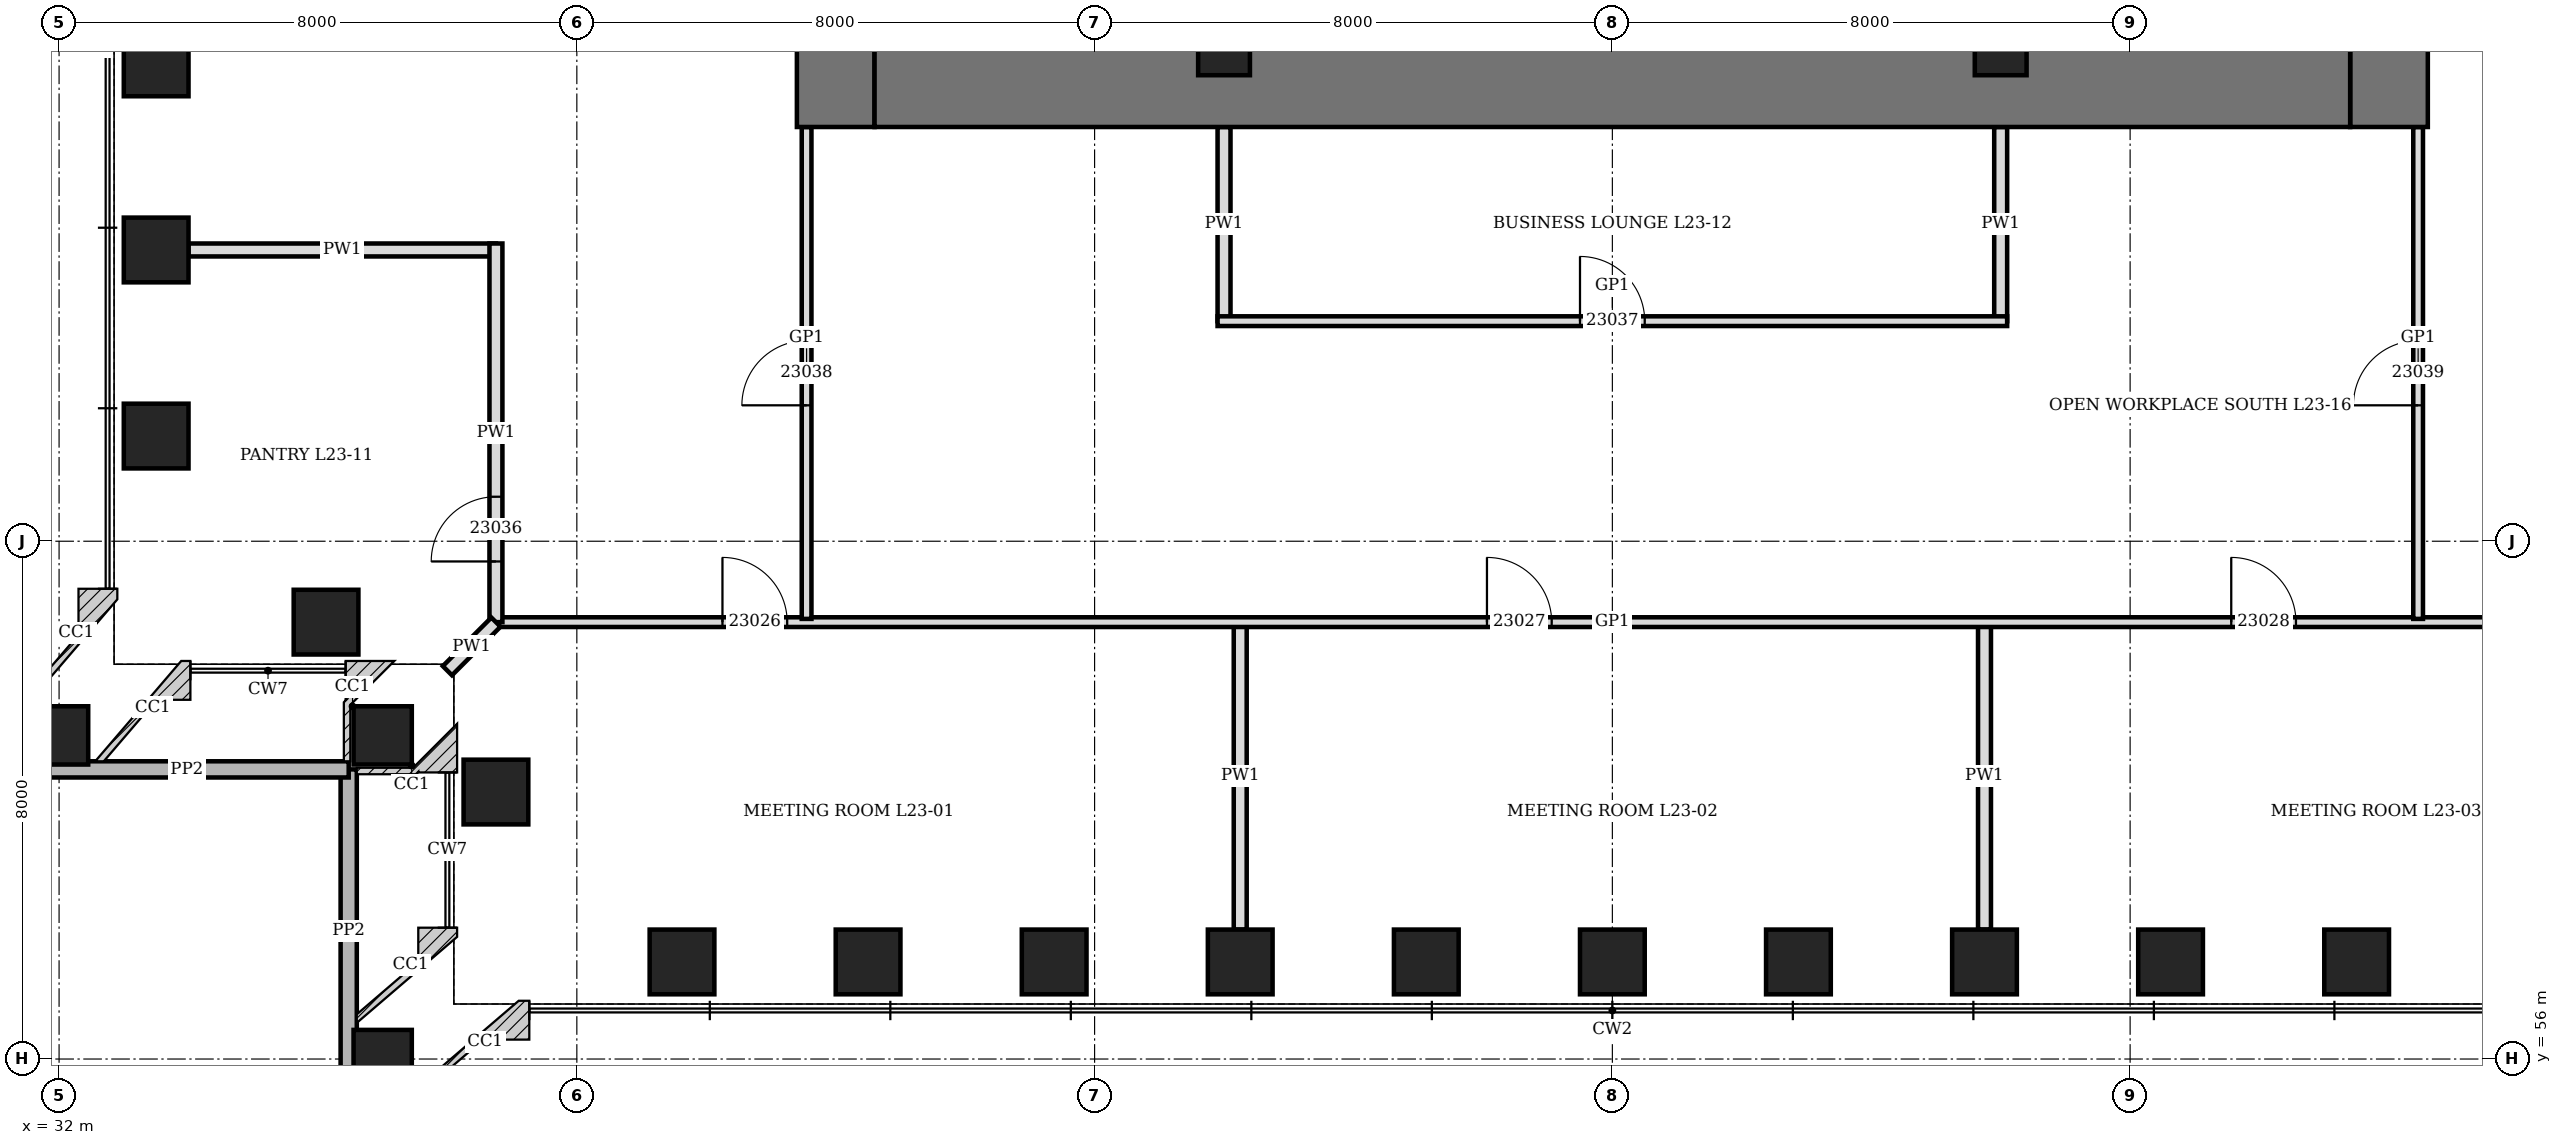
"""IFC4 building model, lengths in metres.
Left out: names, types, materials, properties, quantities, classifications, styles, units other than length and angle.
Written with IfcOpenShell. Run it as: python <this file> out.ifc"""

import sys

from ifc_helpers import new_model, si_unit, direction, frame, frame_2d, origin, origin_2d, place, context, subcontext, project, spatial, rectangle, hollow_rectangle, extrude, clip, halfspace, element, fill, save


model = new_model("IFC4")
c1 = context("Model", 3, precision=1e-05, world=origin(), true_north=direction((0.0, 1.0)))
c2 = subcontext(c1, "Body", "Model", "MODEL_VIEW")
j1 = project(units=[si_unit("LENGTHUNIT", "METRE"), si_unit("PLANEANGLEUNIT", "RADIAN")], contexts=[c1])
p1 = place(None, origin())
s1 = spatial("IfcSite", under=j1, at=p1, CompositionType="ELEMENT")
p2 = place(p1, origin())
s2 = spatial("IfcBuilding", under=s1, at=p2, CompositionType="ELEMENT")
p3 = place(p2, frame((0.0, 0.0, 108.1)))
s3 = spatial("IfcBuildingStorey", under=s2, at=p3, CompositionType="ELEMENT", Elevation=108.1)
p4 = place(p3, frame((37.0, 56.0, -0.25), z_axis=(0.349200787792, 0.299314960964, 0.887957974202), x_axis=(-0.650791373456, 0.759256602365, 0.0)))
e1 = element("IfcColumn", 1, at=p4, inside=s3, PredefinedType="COLUMN", context=c2, shape_type="Clipping", body=[
    clip(clip(extrude(hollow_rectangle(XDim=0.9, YDim=0.9, WallThickness=0.2, at=origin_2d()), origin(), (0.0, 0.0, 1.0), 5.011), halfspace(frame((0.0, 0.0, 0.235), z_axis=(0.0, 0.0, 1.0), x_axis=(1.0, 0.0, 0.0)), True)), halfspace(frame((0.0, 0.0, 4.776), z_axis=(0.0, 0.0, -1.0), x_axis=(1.0, 0.0, 0.0)), True)),
])
for number, where, z_axis, x_axis in (
    (2, (41.625, 57.5, -0.25), (0.0, 0.0, 1.0), (1.0, 0.0, 0.0)),
    (3, (44.5, 57.5, -0.25), (0.0, 0.0, 1.0), (1.0, 0.0, 0.0)),
    (4, (47.375, 57.5, -0.25), (0.0, 0.0, 1.0), (1.0, 0.0, 0.0)),
    (5, (50.25, 57.5, -0.25), (0.0, 0.0, 1.0), (1.0, 0.0, 0.0)),
    (6, (53.125, 57.5, -0.25), (0.0, 0.0, 1.0), (1.0, 0.0, 0.0)),
    (7, (56.0, 57.5, -0.25), (0.0, 0.0, 1.0), (1.0, 0.0, 0.0)),
    (8, (58.875, 57.5, -0.25), (0.0, 0.0, 1.0), (1.0, 0.0, 0.0)),
    (9, (61.75, 57.5, -0.25), (0.0, 0.0, 1.0), (1.0, 0.0, 0.0)),
    (10, (64.625, 57.5, -0.25), (0.0, 0.0, 1.0), (1.0, 0.0, 0.0)),
    (11, (67.5, 57.5, -0.25), (0.0, 0.0, 1.0), (1.0, 0.0, 0.0)),
    (12, (33.5, 71.375, -0.25), (0.0, 0.0, 1.0), (0.0, 1.0, 0.0)),
    (13, (33.5, 68.5, -0.25), (0.0, 0.0, 1.0), (0.0, 1.0, 0.0)),
    (14, (33.5, 65.625, -0.25), (0.0, 0.0, 1.0), (0.0, 1.0, 0.0)),
):
    element("IfcColumn", number, at=place(p3, frame(where, z_axis=z_axis, x_axis=x_axis)), inside=s3, PredefinedType="COLUMN", context=c2, shape_type="SweptSolid", body=[
        extrude(hollow_rectangle(XDim=1.0, YDim=1.0, WallThickness=0.35, at=origin_2d()), origin(), (0.0, 0.0, 1.0), 4.45),
    ])
p5 = place(p3, frame((32.0, 61.0, -0.25), z_axis=(0.299314960964, 0.349200787792, 0.887957974202), x_axis=(-0.759256602365, 0.650791373456, 0.0)))
e15 = element("IfcColumn", 15, at=p5, inside=s3, PredefinedType="COLUMN", context=c2, shape_type="Clipping", body=[
    clip(clip(extrude(hollow_rectangle(XDim=0.9, YDim=0.9, WallThickness=0.2, at=origin_2d()), origin(), (0.0, 0.0, 1.0), 5.011), halfspace(frame((0.0, 0.0, 0.235), z_axis=(0.0, 0.0, 1.0), x_axis=(1.0, 0.0, 0.0)), True)), halfspace(frame((0.0, 0.0, 4.776), z_axis=(0.0, 0.0, -1.0), x_axis=(1.0, 0.0, 0.0)), True)),
])
p6 = place(p3, frame((36.125, 62.75, -0.25), z_axis=(0.0, 0.0, 1.0), x_axis=(1.0, 0.0, 0.0)))
e16 = element("IfcColumn", 16, at=p6, inside=s3, PredefinedType="COLUMN", context=c2, shape_type="SweptSolid", body=[
    extrude(hollow_rectangle(XDim=1.0, YDim=1.0, WallThickness=0.35, at=origin_2d()), origin(), (0.0, 0.0, 1.0), 4.45),
])
p7 = place(p3, frame((37.0, 61.0, -0.25), z_axis=(0.343685624304, 0.343685624304, 0.873933855216), x_axis=(-0.707106781187, 0.707106781187, 0.0)))
e17 = element("IfcColumn", 17, at=p7, inside=s3, PredefinedType="COLUMN", context=c2, shape_type="Clipping", body=[
    clip(clip(extrude(hollow_rectangle(XDim=0.9, YDim=0.9, WallThickness=0.2, at=origin_2d()), origin(), (0.0, 0.0, 1.0), 5.092), halfspace(frame((0.0, 0.0, 0.253), z_axis=(0.0, 0.0, 1.0), x_axis=(1.0, 0.0, 0.0)), True)), halfspace(frame((0.0, 0.0, 4.839), z_axis=(0.0, 0.0, -1.0), x_axis=(1.0, 0.0, 0.0)), True)),
])
p8 = place(p3, frame((38.75, 60.125, -0.25), z_axis=(0.0, 0.0, 1.0), x_axis=(0.0, 1.0, 0.0)))
e18 = element("IfcColumn", 18, at=p8, inside=s3, PredefinedType="COLUMN", context=c2, shape_type="SweptSolid", body=[
    extrude(hollow_rectangle(XDim=1.0, YDim=1.0, WallThickness=0.35, at=origin_2d()), origin(), (0.0, 0.0, 1.0), 4.45),
])
p9 = place(p3, frame((44.0, 70.4, 0.0), z_axis=(0.0, 0.0, 1.0), x_axis=(0.0, 1.0, 0.0)))
e19 = element("IfcWall", 19, at=p9, inside=s3, PredefinedType="SHEAR", context=c2, shape_type="SweptSolid", body=[
    extrude(rectangle(XDim=19.2, YDim=1.2, at=frame_2d((9.6, 0.0))), origin(), (0.0, 0.0, 1.0), 4.2),
])
p10 = place(p9, frame((8.6, 0.0, 0.0)))
e20 = element("IfcOpeningElement", 20, at=p10, cuts=e19, PredefinedType="OPENING", context=c2, shape_type="SweptSolid", body=[
    extrude(rectangle(XDim=2.0, YDim=2.4, at=frame_2d((1.0, 1.2))), frame((0.0, 0.61, 0.0), z_axis=(0.0, -1.0, 0.0), x_axis=(1.0, 0.0, 0.0)), (0.0, 0.0, 1.0), 1.22),
])
p11 = place(p3, frame((68.0, 70.4, 0.0), z_axis=(0.0, 0.0, 1.0), x_axis=(0.0, 1.0, 0.0)))
e21 = element("IfcWall", 21, at=p11, inside=s3, PredefinedType="SHEAR", context=c2, shape_type="SweptSolid", body=[
    extrude(rectangle(XDim=19.2, YDim=1.2, at=frame_2d((9.6, 0.0))), origin(), (0.0, 0.0, 1.0), 4.2),
])
p12 = place(p11, frame((8.6, 0.0, 0.0)))
e22 = element("IfcOpeningElement", 22, at=p12, cuts=e21, PredefinedType="OPENING", context=c2, shape_type="SweptSolid", body=[
    extrude(rectangle(XDim=2.0, YDim=2.4, at=frame_2d((1.0, 1.2))), frame((0.0, 0.61, 0.0), z_axis=(0.0, -1.0, 0.0), x_axis=(1.0, 0.0, 0.0)), (0.0, 0.0, 1.0), 1.22),
])
p13 = place(p3, frame((44.6, 71.0, 0.0), z_axis=(0.0, 0.0, 1.0), x_axis=(1.0, 0.0, 0.0)))
e23 = element("IfcWall", 23, at=p13, inside=s3, PredefinedType="SHEAR", context=c2, shape_type="SweptSolid", body=[
    extrude(rectangle(XDim=22.8, YDim=1.2, at=frame_2d((11.4, 0.0))), origin(), (0.0, 0.0, 1.0), 4.2),
])
for number, where, z_axis, x_axis in (
    (24, (50.0, 71.6, 0.0), (0.0, 0.0, 1.0), (1.0, 0.0, 0.0)),
    (25, (62.0, 71.6, 0.0), (0.0, 0.0, 1.0), (1.0, 0.0, 0.0)),
):
    element("IfcColumn", number, at=place(p3, frame(where, z_axis=z_axis, x_axis=x_axis)), inside=s3, PredefinedType="COLUMN", context=c2, shape_type="SweptSolid", body=[
        extrude(hollow_rectangle(XDim=0.8, YDim=0.8, WallThickness=0.1, at=origin_2d()), origin(), (0.0, 0.0, 1.0), 4.2),
    ])
for number, where, z_axis, x_axis in (
    (26, (36.475, 55.475, 0.0), (0.0, 0.0, 1.0), (0.0, 1.0, 0.0)),
    (27, (36.475, 60.475, 0.0), (0.0, 0.0, 1.0), (-1.0, 0.0, 0.0)),
):
    element("IfcWall", number, at=place(p3, frame(where, z_axis=z_axis, x_axis=x_axis)), inside=s3, PredefinedType="PARAPET", context=c2, shape_type="SweptSolid", body=[
        extrude(rectangle(XDim=5.0, YDim=0.25, at=frame_2d((2.5, 0.0))), origin(), (0.0, 0.0, 1.0), 1.1),
    ])
for number, where, z_axis, x_axis in (
    (28, (50.25, 58.0, 0.0), (0.0, 0.0, 1.0), (0.0, 1.0, 0.0)),
    (29, (61.75, 58.0, 0.0), (0.0, 0.0, 1.0), (0.0, 1.0, 0.0)),
):
    element("IfcWall", number, at=place(p3, frame(where, z_axis=z_axis, x_axis=x_axis)), inside=s3, PredefinedType="PARTITIONING", context=c2, shape_type="SweptSolid", body=[
        extrude(rectangle(XDim=4.75, YDim=0.2, at=frame_2d((2.375, 0.0))), origin(), (0.0, 0.0, 1.0), 3.278),
    ])
p14 = place(p3, frame((34.0, 68.5, 0.0), z_axis=(0.0, 0.0, 1.0), x_axis=(1.0, 0.0, 0.0)))
e30 = element("IfcWall", 30, at=p14, inside=s3, PredefinedType="PARTITIONING", context=c2, shape_type="SweptSolid", body=[
    extrude(rectangle(XDim=4.75, YDim=0.2, at=frame_2d((2.375, 0.0))), origin(), (0.0, 0.0, 1.0), 3.428),
])
for number, where, z_axis, x_axis in (
    (31, (50.0, 67.4, 0.0), (0.0, 0.0, 1.0), (0.0, 1.0, 0.0)),
    (32, (62.0, 67.4, 0.0), (0.0, 0.0, 1.0), (0.0, 1.0, 0.0)),
):
    element("IfcWall", number, at=place(p3, frame(where, z_axis=z_axis, x_axis=x_axis)), inside=s3, PredefinedType="PARTITIONING", context=c2, shape_type="SweptSolid", body=[
        extrude(rectangle(XDim=3.0, YDim=0.2, at=frame_2d((1.5, 0.0))), origin(), (0.0, 0.0, 1.0), 4.04),
    ])
p15 = place(p3, frame((38.75, 62.75, 0.0), z_axis=(0.0, 0.0, 1.0), x_axis=(1.0, 0.0, 0.0)))
e33 = element("IfcWall", 33, at=p15, inside=s3, PredefinedType="PARTITIONING", context=c2, shape_type="SweptSolid", body=[
    extrude(rectangle(XDim=34.5, YDim=0.15, at=frame_2d((17.25, 0.0))), origin(), (0.0, 0.0, 1.0), 4.04),
])
p16 = place(p15, frame((3.5, 0.0, 0.0)))
e34 = element("IfcOpeningElement", 34, at=p16, cuts=e33, PredefinedType="OPENING", context=c2, shape_type="SweptSolid", body=[
    extrude(rectangle(XDim=1.0, YDim=2.4, at=frame_2d((0.5, 1.2))), frame((0.0, 0.085, 0.0), z_axis=(0.0, -1.0, 0.0), x_axis=(1.0, 0.0, 0.0)), (0.0, 0.0, 1.0), 0.17),
])
p17 = place(p15, frame((15.312, 0.0, 0.0)))
e35 = element("IfcOpeningElement", 35, at=p17, cuts=e33, PredefinedType="OPENING", context=c2, shape_type="SweptSolid", body=[
    extrude(rectangle(XDim=1.0, YDim=2.4, at=frame_2d((0.5, 1.2))), frame((0.0, 0.085, 0.0), z_axis=(0.0, -1.0, 0.0), x_axis=(1.0, 0.0, 0.0)), (0.0, 0.0, 1.0), 0.17),
])
p18 = place(p15, frame((26.812, 0.0, 0.0)))
e36 = element("IfcOpeningElement", 36, at=p18, cuts=e33, PredefinedType="OPENING", context=c2, shape_type="SweptSolid", body=[
    extrude(rectangle(XDim=1.0, YDim=2.4, at=frame_2d((0.5, 1.2))), frame((0.0, 0.085, 0.0), z_axis=(0.0, -1.0, 0.0), x_axis=(1.0, 0.0, 0.0)), (0.0, 0.0, 1.0), 0.17),
])
p19 = place(p3, frame((49.9, 67.4, 0.0), z_axis=(0.0, 0.0, 1.0), x_axis=(1.0, 0.0, 0.0)))
e37 = element("IfcWall", 37, at=p19, inside=s3, PredefinedType="PARTITIONING", context=c2, shape_type="SweptSolid", body=[
    extrude(rectangle(XDim=12.2, YDim=0.15, at=frame_2d((6.1, 0.0))), origin(), (0.0, 0.0, 1.0), 4.04),
])
p20 = place(p19, frame((5.6, 0.0, 0.0)))
e38 = element("IfcOpeningElement", 38, at=p20, cuts=e37, PredefinedType="OPENING", context=c2, shape_type="SweptSolid", body=[
    extrude(rectangle(XDim=1.0, YDim=2.4, at=frame_2d((0.5, 1.2))), frame((0.0, 0.085, 0.0), z_axis=(0.0, -1.0, 0.0), x_axis=(1.0, 0.0, 0.0)), (0.0, 0.0, 1.0), 0.17),
])
p21 = place(p3, frame((38.75, 62.75, 0.0), z_axis=(0.0, 0.0, 1.0), x_axis=(0.0, 1.0, 0.0)))
e39 = element("IfcWall", 39, at=p21, inside=s3, PredefinedType="PARTITIONING", context=c2, shape_type="SweptSolid", body=[
    extrude(rectangle(XDim=5.85, YDim=0.2, at=frame_2d((2.925, 0.0))), origin(), (0.0, 0.0, 1.0), 4.04),
])
p22 = place(p21, frame((0.938, 0.0, 0.0)))
e40 = element("IfcOpeningElement", 40, at=p22, cuts=e39, PredefinedType="OPENING", context=c2, shape_type="SweptSolid", body=[
    extrude(rectangle(XDim=1.0, YDim=2.1, at=frame_2d((0.5, 1.05))), frame((0.0, 0.11, 0.0), z_axis=(0.0, -1.0, 0.0), x_axis=(1.0, 0.0, 0.0)), (0.0, 0.0, 1.0), 0.22),
])
p23 = place(p3, frame((43.55, 62.8, 0.0), z_axis=(0.0, 0.0, 1.0), x_axis=(0.0, 1.0, 0.0)))
e41 = element("IfcWall", 41, at=p23, inside=s3, PredefinedType="PARTITIONING", context=c2, shape_type="SweptSolid", body=[
    extrude(rectangle(XDim=7.6, YDim=0.15, at=frame_2d((3.8, 0.0))), origin(), (0.0, 0.0, 1.0), 4.04),
])
p24 = place(p23, frame((3.3, 0.0, 0.0)))
e42 = element("IfcOpeningElement", 42, at=p24, cuts=e41, PredefinedType="OPENING", context=c2, shape_type="SweptSolid", body=[
    extrude(rectangle(XDim=1.0, YDim=2.4, at=frame_2d((0.5, 1.2))), frame((0.0, 0.085, 0.0), z_axis=(0.0, -1.0, 0.0), x_axis=(1.0, 0.0, 0.0)), (0.0, 0.0, 1.0), 0.17),
])
p25 = place(p3, frame((68.45, 62.8, 0.0), z_axis=(0.0, 0.0, 1.0), x_axis=(0.0, 1.0, 0.0)))
e43 = element("IfcWall", 43, at=p25, inside=s3, PredefinedType="PARTITIONING", context=c2, shape_type="SweptSolid", body=[
    extrude(rectangle(XDim=7.6, YDim=0.15, at=frame_2d((3.8, 0.0))), origin(), (0.0, 0.0, 1.0), 4.04),
])
p26 = place(p25, frame((3.3, 0.0, 0.0)))
e44 = element("IfcOpeningElement", 44, at=p26, cuts=e43, PredefinedType="OPENING", context=c2, shape_type="SweptSolid", body=[
    extrude(rectangle(XDim=1.0, YDim=2.4, at=frame_2d((0.5, 1.2))), frame((0.0, 0.085, 0.0), z_axis=(0.0, -1.0, 0.0), x_axis=(1.0, 0.0, 0.0)), (0.0, 0.0, 1.0), 0.17),
])
p27 = place(p3, frame((38.75, 62.75, 0.0), z_axis=(0.0, 0.0, 1.0), x_axis=(-0.707106781187, -0.707106781187, 0.0)))
e45 = element("IfcWall", 45, at=p27, inside=s3, PredefinedType="PARTITIONING", context=c2, shape_type="SweptSolid", body=[
    extrude(rectangle(XDim=1.061, YDim=0.2, at=frame_2d((0.53, 0.0))), origin(), (0.0, 0.0, 1.0), 4.04),
])
p28 = place(p16, origin())
e46 = element("IfcDoor", 46, at=p28, inside=s3, OperationType="SINGLE_SWING_RIGHT", PredefinedType="DOOR", context=c2, shape_type="SweptSolid", body=[
    extrude(rectangle(XDim=1.0, YDim=2.4, at=frame_2d((0.5, 1.2))), frame((0.0, 0.075, 0.0), z_axis=(0.0, -1.0, 0.0), x_axis=(1.0, 0.0, 0.0)), (0.0, 0.0, 1.0), 0.149),
])
fill(e34, e46)
p29 = place(p17, origin())
e47 = element("IfcDoor", 47, at=p29, inside=s3, OperationType="SINGLE_SWING_RIGHT", PredefinedType="DOOR", context=c2, shape_type="SweptSolid", body=[
    extrude(rectangle(XDim=1.0, YDim=2.4, at=frame_2d((0.5, 1.2))), frame((0.0, 0.075, 0.0), z_axis=(0.0, -1.0, 0.0), x_axis=(1.0, 0.0, 0.0)), (0.0, 0.0, 1.0), 0.149),
])
fill(e35, e47)
p30 = place(p18, origin())
e48 = element("IfcDoor", 48, at=p30, inside=s3, OperationType="SINGLE_SWING_RIGHT", PredefinedType="DOOR", context=c2, shape_type="SweptSolid", body=[
    extrude(rectangle(XDim=1.0, YDim=2.4, at=frame_2d((0.5, 1.2))), frame((0.0, 0.075, 0.0), z_axis=(0.0, -1.0, 0.0), x_axis=(1.0, 0.0, 0.0)), (0.0, 0.0, 1.0), 0.149),
])
fill(e36, e48)
p31 = place(p22, origin())
e49 = element("IfcDoor", 49, at=p31, inside=s3, OperationType="SINGLE_SWING_LEFT", PredefinedType="DOOR", context=c2, shape_type="SweptSolid", body=[
    extrude(rectangle(XDim=1.0, YDim=2.1, at=frame_2d((0.5, 1.05))), frame((0.0, 0.1, 0.0), z_axis=(0.0, -1.0, 0.0), x_axis=(1.0, 0.0, 0.0)), (0.0, 0.0, 1.0), 0.199),
])
fill(e40, e49)
p32 = place(p20, origin())
e50 = element("IfcDoor", 50, at=p32, inside=s3, OperationType="SINGLE_SWING_RIGHT", PredefinedType="DOOR", context=c2, shape_type="SweptSolid", body=[
    extrude(rectangle(XDim=1.0, YDim=2.4, at=frame_2d((0.5, 1.2))), frame((0.0, 0.075, 0.0), z_axis=(0.0, -1.0, 0.0), x_axis=(1.0, 0.0, 0.0)), (0.0, 0.0, 1.0), 0.149),
])
fill(e38, e50)
p33 = place(p24, origin())
e51 = element("IfcDoor", 51, at=p33, inside=s3, OperationType="SINGLE_SWING_RIGHT", PredefinedType="DOOR", context=c2, shape_type="SweptSolid", body=[
    extrude(rectangle(XDim=1.0, YDim=2.4, at=frame_2d((0.5, 1.2))), frame((0.0, 0.075, 0.0), z_axis=(0.0, -1.0, 0.0), x_axis=(1.0, 0.0, 0.0)), (0.0, 0.0, 1.0), 0.149),
])
fill(e42, e51)
p34 = place(p26, origin())
e52 = element("IfcDoor", 52, at=p34, inside=s3, OperationType="SINGLE_SWING_RIGHT", PredefinedType="DOOR", context=c2, shape_type="SweptSolid", body=[
    extrude(rectangle(XDim=1.0, YDim=2.4, at=frame_2d((0.5, 1.2))), frame((0.0, 0.075, 0.0), z_axis=(0.0, -1.0, 0.0), x_axis=(1.0, 0.0, 0.0)), (0.0, 0.0, 1.0), 0.149),
])
fill(e44, e52)
save(model, sys.argv[1])
